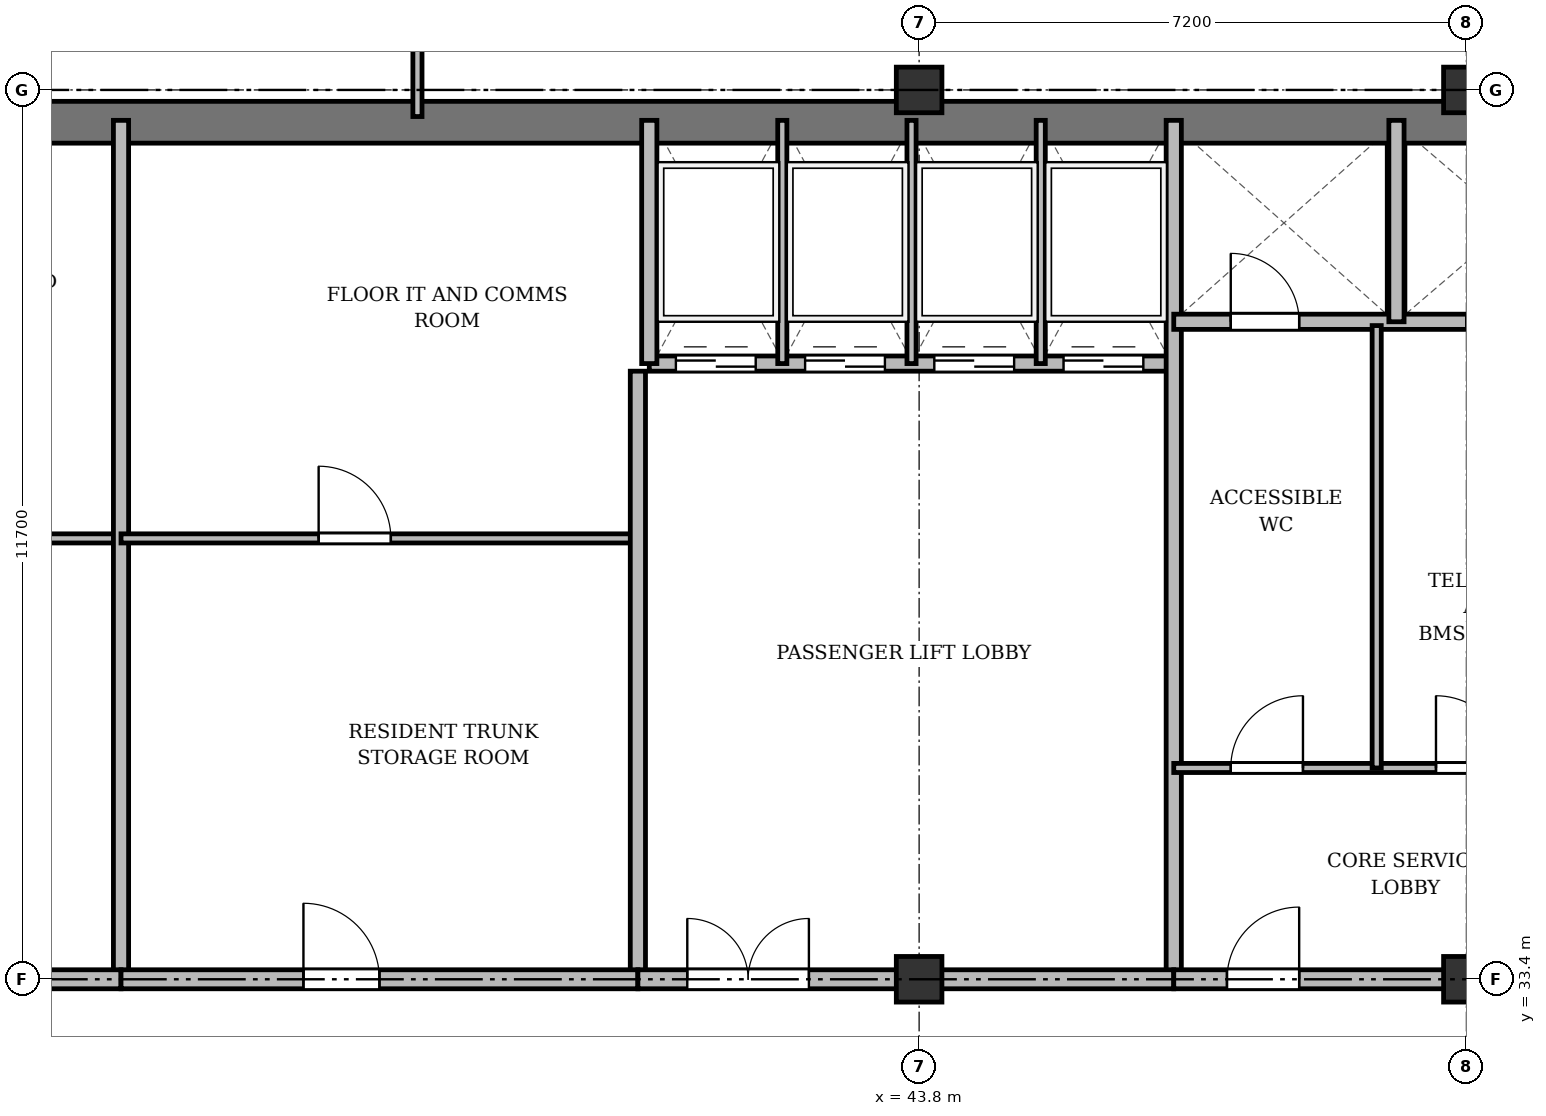
"""IFC4 building model, lengths in metres.
Left out: names, types, materials, properties, quantities, classifications, styles, units other than length and angle.
Written with IfcOpenShell. Run it as: python <this file> out.ifc"""

import sys

from ifc_helpers import new_model, si_unit, direction, frame, frame_2d, origin, origin_2d, place, context, subcontext, project, spatial, rectangle, extrude, source, transform, mapped, element, fill, save


model = new_model("IFC4")
c1 = context("Model", 3, precision=1e-05, world=origin(), true_north=direction((0.0, 1.0)))
c2 = subcontext(c1, "Body", "Model", "MODEL_VIEW")
j1 = project(units=[si_unit("LENGTHUNIT", "METRE"), si_unit("PLANEANGLEUNIT", "RADIAN")], contexts=[c1])
p1 = place(None, origin())
s1 = spatial("IfcSite", under=j1, at=p1, CompositionType="ELEMENT")
p2 = place(p1, origin())
s2 = spatial("IfcBuilding", under=s1, at=p2, CompositionType="ELEMENT")
p3 = place(p2, frame((0.0, 0.0, 273.9)))
s3 = spatial("IfcBuildingStorey", under=s2, at=p3, CompositionType="ELEMENT", Elevation=273.9)
m1 = source(origin(), c2, "Body", "SweptSolid", [
    extrude(rectangle(XDim=0.6, YDim=0.6, at=origin_2d()), origin(), (0.0, 0.0, 1.0), 3.6),
])
for number, where, z_axis, x_axis in (
    (1, (43.8, 33.4, 0.0), (0.0, 0.0, 1.0), (1.0, 0.0, 0.0)),
    (2, (43.8, 45.1, 0.0), (0.0, 0.0, 1.0), (1.0, 0.0, 0.0)),
    (3, (51.0, 33.4, 0.0), (0.0, 0.0, 1.0), (1.0, 0.0, 0.0)),
    (4, (51.0, 45.1, 0.0), (0.0, 0.0, 1.0), (1.0, 0.0, 0.0)),
):
    element("IfcColumn", number, at=place(p3, frame(where, z_axis=z_axis, x_axis=x_axis)), inside=s3, PredefinedType="COLUMN", context=c2, shape_type="MappedRepresentation", body=[
        mapped(m1, transform((0.0, 0.0, 0.0), x_axis=(1.0, 0.0, 0.0), y_axis=(0.0, 1.0, 0.0), z_axis=(0.0, 0.0, 1.0), scale=1.0)),
    ])
p4 = place(p3, frame((15.65, 44.675, 0.0), z_axis=(0.0, 0.0, 1.0), x_axis=(1.0, 0.0, 0.0)))
e5 = element("IfcWall", 5, at=p4, inside=s3, PredefinedType="SHEAR", context=c2, shape_type="SweptSolid", body=[
    extrude(rectangle(XDim=43.1, YDim=0.55, at=frame_2d((21.55, 0.0))), origin(), (0.0, 0.0, 1.0), 3.37),
])
p5 = place(p3, frame((26.3, 39.2, 0.0), z_axis=(0.0, 0.0, 1.0), x_axis=(1.0, 0.0, 0.0)))
e6 = element("IfcWall", 6, at=p5, inside=s3, PredefinedType="PARTITIONING", context=c2, shape_type="SweptSolid", body=[
    extrude(rectangle(XDim=7.0, YDim=0.12, at=frame_2d((3.5, 0.0))), origin(), (0.0, 0.0, 1.0), 2.87),
])
p6 = place(p5, frame((2.6, 0.0, 0.0)))
e7 = element("IfcOpeningElement", 7, at=p6, cuts=e6, PredefinedType="OPENING", context=c2, shape_type="SweptSolid", body=[
    extrude(rectangle(XDim=0.95, YDim=2.15, at=frame_2d((0.475, 1.075))), frame((0.0, 0.07, 0.0), z_axis=(0.0, -1.0, 0.0), x_axis=(1.0, 0.0, 0.0)), (0.0, 0.0, 1.0), 0.14),
])
p7 = place(p3, frame((33.3, 33.4, 0.0), z_axis=(0.0, 0.0, 1.0), x_axis=(0.0, 1.0, 0.0)))
e8 = element("IfcWall", 8, at=p7, inside=s3, PredefinedType="SOLIDWALL", context=c2, shape_type="SweptSolid", body=[
    extrude(rectangle(XDim=11.3, YDim=0.2, at=frame_2d((5.65, 0.0))), origin(), (0.0, 0.0, 1.0), 2.92),
])
p8 = place(p3, frame((33.3, 39.2, 0.0), z_axis=(0.0, 0.0, 1.0), x_axis=(1.0, 0.0, 0.0)))
e9 = element("IfcWall", 9, at=p8, inside=s3, PredefinedType="PARTITIONING", context=c2, shape_type="SweptSolid", body=[
    extrude(rectangle(XDim=6.8, YDim=0.12, at=frame_2d((3.4, 0.0))), origin(), (0.0, 0.0, 1.0), 3.37),
])
p9 = place(p8, frame((2.6, 0.0, 0.0)))
e10 = element("IfcOpeningElement", 10, at=p9, cuts=e9, PredefinedType="OPENING", context=c2, shape_type="SweptSolid", body=[
    extrude(rectangle(XDim=0.95, YDim=2.15, at=frame_2d((0.475, 1.075))), frame((0.0, 0.07, 0.0), z_axis=(0.0, -1.0, 0.0), x_axis=(1.0, 0.0, 0.0)), (0.0, 0.0, 1.0), 0.14),
])
p10 = place(p3, frame((40.1, 33.4, 0.0), z_axis=(0.0, 0.0, 1.0), x_axis=(0.0, 1.0, 0.0)))
e11 = element("IfcWall", 11, at=p10, inside=s3, PredefinedType="SOLIDWALL", context=c2, shape_type="SweptSolid", body=[
    extrude(rectangle(XDim=8.0, YDim=0.2, at=frame_2d((4.0, 0.0))), origin(), (0.0, 0.0, 1.0), 2.92),
])
p11 = place(p3, frame((40.25, 41.5, 0.0), z_axis=(0.0, 0.0, 1.0), x_axis=(1.0, 0.0, 0.0)))
e12 = element("IfcWall", 12, at=p11, inside=s3, PredefinedType="SOLIDWALL", context=c2, shape_type="SweptSolid", body=[
    extrude(rectangle(XDim=6.9, YDim=0.2, at=frame_2d((3.45, 0.0))), origin(), (0.0, 0.0, 1.0), 3.37),
])
p12 = place(p11, frame((0.35, 0.0, 0.0)))
e13 = element("IfcOpeningElement", 13, at=p12, cuts=e12, PredefinedType="OPENING", context=c2, shape_type="SweptSolid", body=[
    extrude(rectangle(XDim=1.05, YDim=2.15, at=frame_2d((0.525, 1.075))), frame((0.0, 0.11, 0.0), z_axis=(0.0, -1.0, 0.0), x_axis=(1.0, 0.0, 0.0)), (0.0, 0.0, 1.0), 0.22),
])
p13 = place(p11, frame((2.05, 0.0, 0.0)))
e14 = element("IfcOpeningElement", 14, at=p13, cuts=e12, PredefinedType="OPENING", context=c2, shape_type="SweptSolid", body=[
    extrude(rectangle(XDim=1.05, YDim=2.15, at=frame_2d((0.525, 1.075))), frame((0.0, 0.11, 0.0), z_axis=(0.0, -1.0, 0.0), x_axis=(1.0, 0.0, 0.0)), (0.0, 0.0, 1.0), 0.22),
])
p14 = place(p11, frame((3.75, 0.0, 0.0)))
e15 = element("IfcOpeningElement", 15, at=p14, cuts=e12, PredefinedType="OPENING", context=c2, shape_type="SweptSolid", body=[
    extrude(rectangle(XDim=1.05, YDim=2.15, at=frame_2d((0.525, 1.075))), frame((0.0, 0.11, 0.0), z_axis=(0.0, -1.0, 0.0), x_axis=(1.0, 0.0, 0.0)), (0.0, 0.0, 1.0), 0.22),
])
p15 = place(p11, frame((5.45, 0.0, 0.0)))
e16 = element("IfcOpeningElement", 16, at=p15, cuts=e12, PredefinedType="OPENING", context=c2, shape_type="SweptSolid", body=[
    extrude(rectangle(XDim=1.05, YDim=2.15, at=frame_2d((0.525, 1.075))), frame((0.0, 0.11, 0.0), z_axis=(0.0, -1.0, 0.0), x_axis=(1.0, 0.0, 0.0)), (0.0, 0.0, 1.0), 0.22),
])
p16 = place(p3, frame((40.25, 41.5, 0.0), z_axis=(0.0, 0.0, 1.0), x_axis=(0.0, 1.0, 0.0)))
e17 = element("IfcWall", 17, at=p16, inside=s3, PredefinedType="SOLIDWALL", context=c2, shape_type="SweptSolid", body=[
    extrude(rectangle(XDim=3.2, YDim=0.2, at=frame_2d((1.6, 0.0))), origin(), (0.0, 0.0, 1.0), 3.37),
])
for number, where, z_axis, x_axis in (
    (18, (42.0, 41.5, 0.0), (0.0, 0.0, 1.0), (0.0, 1.0, 0.0)),
    (19, (43.7, 41.5, 0.0), (0.0, 0.0, 1.0), (0.0, 1.0, 0.0)),
    (20, (45.4, 41.5, 0.0), (0.0, 0.0, 1.0), (0.0, 1.0, 0.0)),
):
    element("IfcWall", number, at=place(p3, frame(where, z_axis=z_axis, x_axis=x_axis)), inside=s3, PredefinedType="PARTITIONING", context=c2, shape_type="SweptSolid", body=[
        extrude(rectangle(XDim=3.2, YDim=0.12, at=frame_2d((1.6, 0.0))), origin(), (0.0, 0.0, 1.0), 3.37),
    ])
p17 = place(p3, frame((47.15, 33.4, 0.0), z_axis=(0.0, 0.0, 1.0), x_axis=(0.0, 1.0, 0.0)))
e21 = element("IfcWall", 21, at=p17, inside=s3, PredefinedType="SOLIDWALL", context=c2, shape_type="SweptSolid", body=[
    extrude(rectangle(XDim=11.3, YDim=0.2, at=frame_2d((5.65, 0.0))), origin(), (0.0, 0.0, 1.0), 2.92),
])
p18 = place(p3, frame((26.3, 33.4, 0.0), z_axis=(0.0, 0.0, 1.0), x_axis=(1.0, 0.0, 0.0)))
e22 = element("IfcWall", 22, at=p18, inside=s3, PredefinedType="PARTITIONING", context=c2, shape_type="SweptSolid", body=[
    extrude(rectangle(XDim=7.0, YDim=0.25, at=frame_2d((3.5, 0.0))), origin(), (0.0, 0.0, 1.0), 2.92),
])
p19 = place(p18, frame((1.35, 0.0, 0.0)))
e23 = element("IfcOpeningElement", 23, at=p19, cuts=e22, PredefinedType="OPENING", context=c2, shape_type="SweptSolid", body=[
    extrude(rectangle(XDim=0.95, YDim=2.15, at=frame_2d((0.475, 1.075))), frame((0.0, 0.135, 0.0), z_axis=(0.0, -1.0, 0.0), x_axis=(1.0, 0.0, 0.0)), (0.0, 0.0, 1.0), 0.27),
])
p20 = place(p3, frame((33.3, 33.4, 0.0), z_axis=(0.0, 0.0, 1.0), x_axis=(1.0, 0.0, 0.0)))
e24 = element("IfcWall", 24, at=p20, inside=s3, PredefinedType="PARTITIONING", context=c2, shape_type="SweptSolid", body=[
    extrude(rectangle(XDim=6.8, YDim=0.25, at=frame_2d((3.4, 0.0))), origin(), (0.0, 0.0, 1.0), 2.92),
])
p21 = place(p20, frame((2.4, 0.0, 0.0)))
e25 = element("IfcOpeningElement", 25, at=p21, cuts=e24, PredefinedType="OPENING", context=c2, shape_type="SweptSolid", body=[
    extrude(rectangle(XDim=1.0, YDim=2.15, at=frame_2d((0.5, 1.075))), frame((0.0, 0.135, 0.0), z_axis=(0.0, -1.0, 0.0), x_axis=(1.0, 0.0, 0.0)), (0.0, 0.0, 1.0), 0.27),
])
p22 = place(p3, frame((40.1, 33.4, 0.0), z_axis=(0.0, 0.0, 1.0), x_axis=(1.0, 0.0, 0.0)))
e26 = element("IfcWall", 26, at=p22, inside=s3, PredefinedType="PARTITIONING", context=c2, shape_type="SweptSolid", body=[
    extrude(rectangle(XDim=7.05, YDim=0.25, at=frame_2d((3.525, 0.0))), origin(), (0.0, 0.0, 1.0), 2.92),
])
p23 = place(p22, frame((0.65, 0.0, 0.0)))
e27 = element("IfcOpeningElement", 27, at=p23, cuts=e26, PredefinedType="OPENING", context=c2, shape_type="SweptSolid", body=[
    extrude(rectangle(XDim=1.6, YDim=2.2, at=frame_2d((0.8, 1.1))), frame((0.0, 0.135, 0.0), z_axis=(0.0, -1.0, 0.0), x_axis=(1.0, 0.0, 0.0)), (0.0, 0.0, 1.0), 0.27),
])
p24 = place(p3, frame((47.15, 42.05, 0.0), z_axis=(0.0, 0.0, 1.0), x_axis=(1.0, 0.0, 0.0)))
e28 = element("IfcWall", 28, at=p24, inside=s3, PredefinedType="SOLIDWALL", context=c2, shape_type="SweptSolid", body=[
    extrude(rectangle(XDim=7.85, YDim=0.2, at=frame_2d((3.925, 0.0))), origin(), (0.0, 0.0, 1.0), 2.87),
])
p25 = place(p24, frame((0.75, 0.0, 0.0)))
e29 = element("IfcOpeningElement", 29, at=p25, cuts=e28, PredefinedType="OPENING", context=c2, shape_type="SweptSolid", body=[
    extrude(rectangle(XDim=0.9, YDim=2.1, at=frame_2d((0.45, 1.05))), frame((0.0, 0.11, 0.0), z_axis=(0.0, -1.0, 0.0), x_axis=(1.0, 0.0, 0.0)), (0.0, 0.0, 1.0), 0.22),
])
p26 = place(p24, frame((3.85, 0.0, 0.0)))
e30 = element("IfcOpeningElement", 30, at=p26, cuts=e28, PredefinedType="OPENING", context=c2, shape_type="SweptSolid", body=[
    extrude(rectangle(XDim=0.9, YDim=2.1, at=frame_2d((0.45, 1.05))), frame((0.0, 0.11, 0.0), z_axis=(0.0, -1.0, 0.0), x_axis=(1.0, 0.0, 0.0)), (0.0, 0.0, 1.0), 0.22),
])
p27 = place(p3, frame((50.08, 42.05, 0.0), z_axis=(0.0, 0.0, 1.0), x_axis=(0.0, 1.0, 0.0)))
e31 = element("IfcWall", 31, at=p27, inside=s3, PredefinedType="SOLIDWALL", context=c2, shape_type="SweptSolid", body=[
    extrude(rectangle(XDim=2.65, YDim=0.2, at=frame_2d((1.325, 0.0))), origin(), (0.0, 0.0, 1.0), 3.37),
])
p28 = place(p3, frame((47.15, 36.18, 0.0), z_axis=(0.0, 0.0, 1.0), x_axis=(1.0, 0.0, 0.0)))
e32 = element("IfcWall", 32, at=p28, inside=s3, PredefinedType="PARTITIONING", context=c2, shape_type="SweptSolid", body=[
    extrude(rectangle(XDim=5.3, YDim=0.12, at=frame_2d((2.65, 0.0))), origin(), (0.0, 0.0, 1.0), 2.87),
])
p29 = place(p28, frame((0.75, 0.0, 0.0)))
e33 = element("IfcOpeningElement", 33, at=p29, cuts=e32, PredefinedType="OPENING", context=c2, shape_type="SweptSolid", body=[
    extrude(rectangle(XDim=0.95, YDim=2.15, at=frame_2d((0.475, 1.075))), frame((0.0, 0.07, 0.0), z_axis=(0.0, -1.0, 0.0), x_axis=(1.0, 0.0, 0.0)), (0.0, 0.0, 1.0), 0.14),
])
p30 = place(p28, frame((3.45, 0.0, 0.0)))
e34 = element("IfcOpeningElement", 34, at=p30, cuts=e32, PredefinedType="OPENING", context=c2, shape_type="SweptSolid", body=[
    extrude(rectangle(XDim=0.95, YDim=2.15, at=frame_2d((0.475, 1.075))), frame((0.0, 0.07, 0.0), z_axis=(0.0, -1.0, 0.0), x_axis=(1.0, 0.0, 0.0)), (0.0, 0.0, 1.0), 0.14),
])
p31 = place(p3, frame((49.82, 36.18, 0.0), z_axis=(0.0, 0.0, 1.0), x_axis=(0.0, 1.0, 0.0)))
e35 = element("IfcWall", 35, at=p31, inside=s3, PredefinedType="PARTITIONING", context=c2, shape_type="SweptSolid", body=[
    extrude(rectangle(XDim=5.82, YDim=0.12, at=frame_2d((2.91, 0.0))), origin(), (0.0, 0.0, 1.0), 3.37),
])
p32 = place(p3, frame((47.15, 33.4, 0.0), z_axis=(0.0, 0.0, 1.0), x_axis=(1.0, 0.0, 0.0)))
e36 = element("IfcWall", 36, at=p32, inside=s3, PredefinedType="PARTITIONING", context=c2, shape_type="SweptSolid", body=[
    extrude(rectangle(XDim=11.15, YDim=0.25, at=frame_2d((5.575, 0.0))), origin(), (0.0, 0.0, 1.0), 2.92),
])
p33 = place(p32, frame((0.7, 0.0, 0.0)))
e37 = element("IfcOpeningElement", 37, at=p33, cuts=e36, PredefinedType="OPENING", context=c2, shape_type="SweptSolid", body=[
    extrude(rectangle(XDim=0.95, YDim=2.15, at=frame_2d((0.475, 1.075))), frame((0.0, 0.135, 0.0), z_axis=(0.0, -1.0, 0.0), x_axis=(1.0, 0.0, 0.0)), (0.0, 0.0, 1.0), 0.27),
])
p34 = place(p32, frame((6.0, 0.0, 0.0)))
e38 = element("IfcOpeningElement", 38, at=p34, cuts=e36, PredefinedType="OPENING", context=c2, shape_type="SweptSolid", body=[
    extrude(rectangle(XDim=1.2, YDim=2.15, at=frame_2d((0.6, 1.075))), frame((0.0, 0.135, 0.0), z_axis=(0.0, -1.0, 0.0), x_axis=(1.0, 0.0, 0.0)), (0.0, 0.0, 1.0), 0.27),
])
p35 = place(p3, frame((37.2, 44.75, 0.0), z_axis=(0.0, 0.0, 1.0), x_axis=(0.0, 1.0, 0.0)))
e39 = element("IfcWall", 39, at=p35, inside=s3, PredefinedType="PARTITIONING", context=c2, shape_type="SweptSolid", body=[
    extrude(rectangle(XDim=3.61, YDim=0.12, at=frame_2d((1.805, 0.0))), origin(), (0.0, 0.0, 1.0), 2.92),
])
p36 = place(p35, frame((1.1, 0.0, 0.0)))
e40 = element("IfcOpeningElement", 40, at=p36, cuts=e39, PredefinedType="OPENING", context=c2, shape_type="SweptSolid", body=[
    extrude(rectangle(XDim=0.95, YDim=2.15, at=frame_2d((0.475, 1.075))), frame((0.0, 0.07, 0.0), z_axis=(0.0, -1.0, 0.0), x_axis=(1.0, 0.0, 0.0)), (0.0, 0.0, 1.0), 0.14),
])
m2 = source(origin(), c2, "Body", "SweptSolid", [
    extrude(rectangle(XDim=0.95, YDim=2.15, at=frame_2d((0.475, 1.075))), frame((0.0, 0.025, 0.0), z_axis=(0.0, -1.0, 0.0), x_axis=(1.0, 0.0, 0.0)), (0.0, 0.0, 1.0), 0.05),
])
p37 = place(p9, origin())
e41 = element("IfcDoor", 41, at=p37, inside=s3, OperationType="SINGLE_SWING_LEFT", PredefinedType="DOOR", context=c2, shape_type="MappedRepresentation", body=[
    mapped(m2, transform((0.0, 0.0, 0.0), x_axis=(1.0, 0.0, 0.0), y_axis=(0.0, 1.0, 0.0), z_axis=(0.0, 0.0, 1.0), scale=1.0)),
])
fill(e10, e41)
m3 = source(origin(), c2, "Body", "SweptSolid", [
    extrude(rectangle(XDim=1.05, YDim=2.15, at=frame_2d((0.525, 1.075))), frame((0.0, 0.025, 0.0), z_axis=(0.0, -1.0, 0.0), x_axis=(1.0, 0.0, 0.0)), (0.0, 0.0, 1.0), 0.05),
])
p38 = place(p12, origin())
e42 = element("IfcDoor", 42, at=p38, inside=s3, OperationType="DOUBLE_DOOR_SLIDING", PredefinedType="DOOR", context=c2, shape_type="MappedRepresentation", body=[
    mapped(m3, transform((0.0, 0.0, 0.0), x_axis=(1.0, 0.0, 0.0), y_axis=(0.0, 1.0, 0.0), z_axis=(0.0, 0.0, 1.0), scale=1.0)),
])
fill(e13, e42)
p39 = place(p13, origin())
e43 = element("IfcDoor", 43, at=p39, inside=s3, OperationType="DOUBLE_DOOR_SLIDING", PredefinedType="DOOR", context=c2, shape_type="MappedRepresentation", body=[
    mapped(m3, transform((0.0, 0.0, 0.0), x_axis=(1.0, 0.0, 0.0), y_axis=(0.0, 1.0, 0.0), z_axis=(0.0, 0.0, 1.0), scale=1.0)),
])
fill(e14, e43)
p40 = place(p14, origin())
e44 = element("IfcDoor", 44, at=p40, inside=s3, OperationType="DOUBLE_DOOR_SLIDING", PredefinedType="DOOR", context=c2, shape_type="MappedRepresentation", body=[
    mapped(m3, transform((0.0, 0.0, 0.0), x_axis=(1.0, 0.0, 0.0), y_axis=(0.0, 1.0, 0.0), z_axis=(0.0, 0.0, 1.0), scale=1.0)),
])
fill(e15, e44)
p41 = place(p15, origin())
e45 = element("IfcDoor", 45, at=p41, inside=s3, OperationType="DOUBLE_DOOR_SLIDING", PredefinedType="DOOR", context=c2, shape_type="MappedRepresentation", body=[
    mapped(m3, transform((0.0, 0.0, 0.0), x_axis=(1.0, 0.0, 0.0), y_axis=(0.0, 1.0, 0.0), z_axis=(0.0, 0.0, 1.0), scale=1.0)),
])
fill(e16, e45)
m4 = source(origin(), c2, "Body", "SweptSolid", [
    extrude(rectangle(XDim=1.0, YDim=2.15, at=frame_2d((0.5, 1.075))), frame((0.0, 0.025, 0.0), z_axis=(0.0, -1.0, 0.0), x_axis=(1.0, 0.0, 0.0)), (0.0, 0.0, 1.0), 0.05),
])
p42 = place(p21, origin())
e46 = element("IfcDoor", 46, at=p42, inside=s3, OperationType="SINGLE_SWING_LEFT", PredefinedType="DOOR", context=c2, shape_type="MappedRepresentation", body=[
    mapped(m4, transform((0.0, 0.0, 0.0), x_axis=(1.0, 0.0, 0.0), y_axis=(0.0, 1.0, 0.0), z_axis=(0.0, 0.0, 1.0), scale=1.0)),
])
fill(e25, e46)
m5 = source(origin(), c2, "Body", "SweptSolid", [
    extrude(rectangle(XDim=1.6, YDim=2.2, at=frame_2d((0.8, 1.1))), frame((0.0, 0.025, 0.0), z_axis=(0.0, -1.0, 0.0), x_axis=(1.0, 0.0, 0.0)), (0.0, 0.0, 1.0), 0.05),
])
p43 = place(p23, origin())
e47 = element("IfcDoor", 47, at=p43, inside=s3, OperationType="DOUBLE_DOOR_SINGLE_SWING", PredefinedType="DOOR", context=c2, shape_type="MappedRepresentation", body=[
    mapped(m5, transform((0.0, 0.0, 0.0), x_axis=(1.0, 0.0, 0.0), y_axis=(0.0, 1.0, 0.0), z_axis=(0.0, 0.0, 1.0), scale=1.0)),
])
fill(e27, e47)
m6 = source(origin(), c2, "Body", "SweptSolid", [
    extrude(rectangle(XDim=0.9, YDim=2.1, at=frame_2d((0.45, 1.05))), frame((0.0, 0.025, 0.0), z_axis=(0.0, -1.0, 0.0), x_axis=(1.0, 0.0, 0.0)), (0.0, 0.0, 1.0), 0.05),
])
p44 = place(p25, origin())
e48 = element("IfcDoor", 48, at=p44, inside=s3, OperationType="SINGLE_SWING_LEFT", PredefinedType="DOOR", context=c2, shape_type="MappedRepresentation", body=[
    mapped(m6, transform((0.0, 0.0, 0.0), x_axis=(1.0, 0.0, 0.0), y_axis=(0.0, 1.0, 0.0), z_axis=(0.0, 0.0, 1.0), scale=1.0)),
])
fill(e29, e48)
p45 = place(p29, origin())
e49 = element("IfcDoor", 49, at=p45, inside=s3, OperationType="SINGLE_SWING_RIGHT", PredefinedType="DOOR", context=c2, shape_type="MappedRepresentation", body=[
    mapped(m2, transform((0.0, 0.0, 0.0), x_axis=(1.0, 0.0, 0.0), y_axis=(0.0, 1.0, 0.0), z_axis=(0.0, 0.0, 1.0), scale=1.0)),
])
fill(e33, e49)
p46 = place(p30, origin())
e50 = element("IfcDoor", 50, at=p46, inside=s3, OperationType="SINGLE_SWING_LEFT", PredefinedType="DOOR", context=c2, shape_type="MappedRepresentation", body=[
    mapped(m2, transform((0.0, 0.0, 0.0), x_axis=(1.0, 0.0, 0.0), y_axis=(0.0, 1.0, 0.0), z_axis=(0.0, 0.0, 1.0), scale=1.0)),
])
fill(e34, e50)
p47 = place(p33, origin())
e51 = element("IfcDoor", 51, at=p47, inside=s3, OperationType="SINGLE_SWING_RIGHT", PredefinedType="DOOR", context=c2, shape_type="MappedRepresentation", body=[
    mapped(m2, transform((0.0, 0.0, 0.0), x_axis=(1.0, 0.0, 0.0), y_axis=(0.0, 1.0, 0.0), z_axis=(0.0, 0.0, 1.0), scale=1.0)),
])
fill(e37, e51)
save(model, sys.argv[1])
